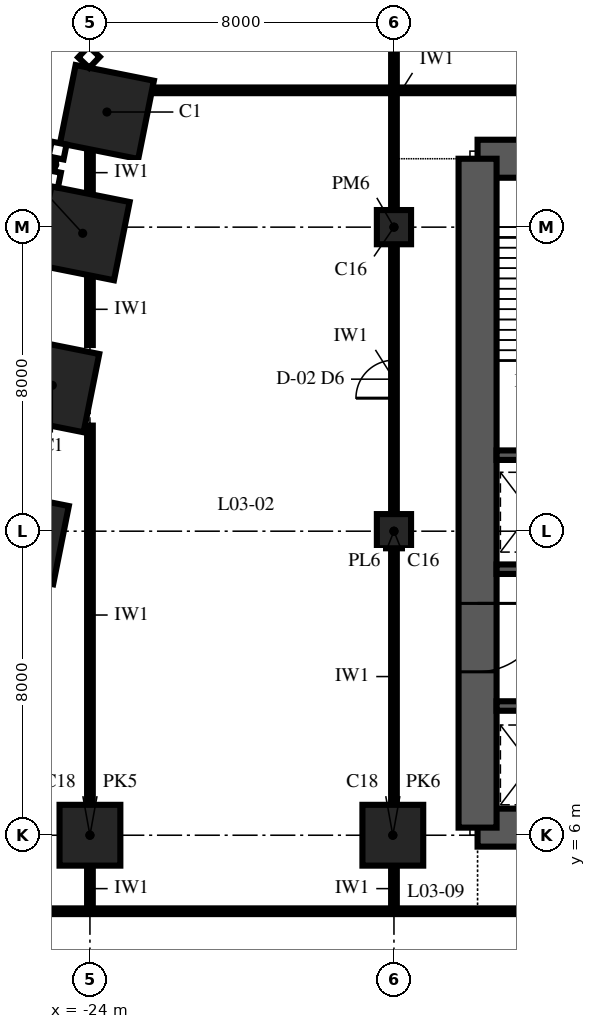
"""IFC4 building model, lengths in metres.
Left out: names, types, materials, properties, quantities, classifications, styles, units other than length and angle.
Written with IfcOpenShell. Run it as: python <this file> out.ifc"""

import sys

from ifc_helpers import new_model, si_unit, direction, frame, frame_2d, origin, origin_2d, place, context, subcontext, project, spatial, polyline, rectangle, outline, extrude, element, fill, save


model = new_model("IFC4")
c1 = context("Model", 3, precision=1e-05, world=origin(), true_north=direction((0.0, 1.0)))
c2 = subcontext(c1, "Body", "Model", "MODEL_VIEW")
j1 = project(units=[si_unit("LENGTHUNIT", "METRE"), si_unit("PLANEANGLEUNIT", "RADIAN")], contexts=[c1])
p1 = place(None, origin())
s1 = spatial("IfcSite", under=j1, at=p1, CompositionType="ELEMENT")
p2 = place(p1, origin())
s2 = spatial("IfcBuilding", under=s1, at=p2, CompositionType="ELEMENT")
p3 = place(p2, frame((0.0, 0.0, 19.0)))
s3 = spatial("IfcBuildingStorey", under=s2, at=p3, CompositionType="ELEMENT", Elevation=19.0)
for number, where, z_axis, x_axis in (
    (1, (-23.553, 25.029, 0.0), (0.0, 0.0, 1.0), (-0.196, -0.981, 0.0)),
    (2, (-24.191, 21.838, 0.0), (0.0, 0.0, 1.0), (-0.196, -0.981, 0.0)),
    (3, (-24.991, 17.838, 0.0), (0.0, 0.0, 1.0), (-0.196, -0.981, 0.0)),
    (4, (-25.791, 13.838, 0.0), (0.0, 0.0, 1.0), (-0.196, -0.981, 0.0)),
):
    element("IfcColumn", number, at=place(p3, frame(where, z_axis=z_axis, x_axis=x_axis)), inside=s3, PredefinedType="COLUMN", context=c2, shape_type="SweptSolid", body=[
        extrude(rectangle(XDim=2.1, YDim=2.1, at=origin_2d()), origin(), (0.0, 0.0, 1.0), 9.0),
    ])
for number, where, z_axis, x_axis in (
    (5, (-24.0, 6.0, 0.0), (0.0, 0.0, 1.0), (1.0, 0.0, 0.0)),
    (6, (-16.03, 6.0, 0.0), (0.0, 0.0, 1.0), (1.0, 0.0, 0.0)),
):
    element("IfcColumn", number, at=place(p3, frame(where, z_axis=z_axis, x_axis=x_axis)), inside=s3, PredefinedType="COLUMN", context=c2, shape_type="SweptSolid", body=[
        extrude(rectangle(XDim=1.6, YDim=1.6, at=origin_2d()), origin(), (0.0, 0.0, 1.0), 9.0),
    ])
for number, where, z_axis, x_axis in (
    (7, (-16.0, 14.0, 0.0), (0.0, 0.0, 1.0), (1.0, 0.0, 0.0)),
    (8, (-16.0, 22.0, 0.0), (0.0, 0.0, 1.0), (1.0, 0.0, 0.0)),
):
    element("IfcColumn", number, at=place(p3, frame(where, z_axis=z_axis, x_axis=x_axis)), inside=s3, PredefinedType="COLUMN", context=c2, shape_type="SweptSolid", body=[
        extrude(rectangle(XDim=0.9, YDim=0.9, at=origin_2d()), origin(), (0.0, 0.0, 1.0), 9.0),
    ])
p4 = place(p3, frame((-13.8, 6.2, 0.0), z_axis=(0.0, 0.0, 1.0), x_axis=(1.0, 0.0, 0.0)))
e9 = element("IfcWall", 9, at=p4, inside=s3, PredefinedType="SHEAR", context=c2, shape_type="SweptSolid", body=[
    extrude(rectangle(XDim=27.6, YDim=1.0, at=frame_2d((13.8, 0.0))), origin(), (0.0, 0.0, 1.0), 9.0),
])
p5 = place(p3, frame((13.8, 23.8, 0.0), z_axis=(0.0, 0.0, 1.0), x_axis=(-1.0, 0.0, 0.0)))
e10 = element("IfcWall", 10, at=p5, inside=s3, PredefinedType="SHEAR", context=c2, shape_type="SweptSolid", body=[
    extrude(rectangle(XDim=27.6, YDim=1.0, at=frame_2d((13.8, 0.0))), origin(), (0.0, 0.0, 1.0), 9.0),
])
p6 = place(p5, frame((21.7, 0.0, 0.0)))
e11 = element("IfcOpeningElement", 11, at=p6, cuts=e10, PredefinedType="OPENING", context=c2, shape_type="SweptSolid", body=[
    extrude(rectangle(XDim=1.0, YDim=2.1, at=frame_2d((0.5, 1.05))), frame((0.0, 0.515, 0.0), z_axis=(0.0, -1.0, 0.0), x_axis=(1.0, 0.0, 0.0)), (0.0, 0.0, 1.0), 1.03),
])
p7 = place(p5, frame((4.9, 0.0, 0.0)))
e12 = element("IfcOpeningElement", 12, at=p7, cuts=e10, PredefinedType="OPENING", context=c2, shape_type="SweptSolid", body=[
    extrude(rectangle(XDim=1.0, YDim=2.1, at=frame_2d((0.5, 1.05))), frame((0.0, 0.515, 0.0), z_axis=(0.0, -1.0, 0.0), x_axis=(1.0, 0.0, 0.0)), (0.0, 0.0, 1.0), 1.03),
])
p8 = place(p5, frame((17.3, 0.0, 0.0)))
e13 = element("IfcOpeningElement", 13, at=p8, cuts=e10, PredefinedType="OPENING", context=c2, shape_type="SweptSolid", body=[
    extrude(rectangle(XDim=1.0, YDim=2.1, at=frame_2d((0.5, 1.05))), frame((0.0, 0.515, 0.0), z_axis=(0.0, -1.0, 0.0), x_axis=(1.0, 0.0, 0.0)), (0.0, 0.0, 1.0), 1.03),
])
p9 = place(p5, frame((13.3, 0.0, 0.0)))
e14 = element("IfcOpeningElement", 14, at=p9, cuts=e10, PredefinedType="OPENING", context=c2, shape_type="SweptSolid", body=[
    extrude(rectangle(XDim=1.0, YDim=2.1, at=frame_2d((0.5, 1.05))), frame((0.0, 0.515, 0.0), z_axis=(0.0, -1.0, 0.0), x_axis=(1.0, 0.0, 0.0)), (0.0, 0.0, 1.0), 1.03),
])
p10 = place(p5, frame((9.3, 0.0, 0.0)))
e15 = element("IfcOpeningElement", 15, at=p10, cuts=e10, PredefinedType="OPENING", context=c2, shape_type="SweptSolid", body=[
    extrude(rectangle(XDim=1.0, YDim=2.1, at=frame_2d((0.5, 1.05))), frame((0.0, 0.515, 0.0), z_axis=(0.0, -1.0, 0.0), x_axis=(1.0, 0.0, 0.0)), (0.0, 0.0, 1.0), 1.03),
])
p11 = place(p3, frame((-13.8, 23.8, 0.0), z_axis=(0.0, 0.0, 1.0), x_axis=(0.0, -1.0, 0.0)))
e16 = element("IfcWall", 16, at=p11, inside=s3, PredefinedType="SHEAR", context=c2, shape_type="SweptSolid", body=[
    extrude(outline(polyline([(0.0, -0.5), (17.6, -0.5), (17.6, 0.0), (17.1, 0.0), (17.1, 0.5), (0.5, 0.5), (0.5, 0.0), (0.0, 0.0), (0.0, -0.5)])), origin(), (0.0, 0.0, 1.0), 9.0),
])
p12 = place(p11, frame((11.7, 0.0, 0.0)))
e17 = element("IfcOpeningElement", 17, at=p12, cuts=e16, PredefinedType="OPENING", context=c2, shape_type="SweptSolid", body=[
    extrude(rectangle(XDim=1.8, YDim=2.4, at=frame_2d((0.9, 1.2))), frame((0.0, 0.515, 0.0), z_axis=(0.0, -1.0, 0.0), x_axis=(1.0, 0.0, 0.0)), (0.0, 0.0, 1.0), 1.03),
])
p13 = place(p3, frame((-13.3, 9.4, 0.0), z_axis=(0.0, 0.0, 1.0), x_axis=(1.0, 0.0, 0.0)))
e18 = element("IfcWall", 18, at=p13, inside=s3, PredefinedType="SHEAR", context=c2, shape_type="SweptSolid", body=[
    extrude(rectangle(XDim=26.6, YDim=0.25, at=frame_2d((13.3, 0.0))), origin(), (0.0, 0.0, 1.0), 9.0),
])
p14 = place(p3, frame((-13.3, 13.0, 0.0), z_axis=(0.0, 0.0, 1.0), x_axis=(1.0, 0.0, 0.0)))
e19 = element("IfcWall", 19, at=p14, inside=s3, PredefinedType="SHEAR", context=c2, shape_type="SweptSolid", body=[
    extrude(rectangle(XDim=26.6, YDim=0.25, at=frame_2d((13.3, 0.0))), origin(), (0.0, 0.0, 1.0), 9.0),
])
p15 = place(p14, frame((16.45, 0.0, 0.0)))
e20 = element("IfcOpeningElement", 20, at=p15, cuts=e19, PredefinedType="OPENING", context=c2, shape_type="SweptSolid", body=[
    extrude(rectangle(XDim=0.9, YDim=2.1, at=frame_2d((0.45, 1.05))), frame((0.0, 0.14, 0.0), z_axis=(0.0, -1.0, 0.0), x_axis=(1.0, 0.0, 0.0)), (0.0, 0.0, 1.0), 0.28),
])
p16 = place(p14, frame((20.05, 0.0, 0.0)))
e21 = element("IfcOpeningElement", 21, at=p16, cuts=e19, PredefinedType="OPENING", context=c2, shape_type="SweptSolid", body=[
    extrude(rectangle(XDim=0.9, YDim=2.1, at=frame_2d((0.45, 1.05))), frame((0.0, 0.14, 0.0), z_axis=(0.0, -1.0, 0.0), x_axis=(1.0, 0.0, 0.0)), (0.0, 0.0, 1.0), 0.28),
])
p17 = place(p14, frame((22.05, 0.0, 0.0)))
e22 = element("IfcOpeningElement", 22, at=p17, cuts=e19, PredefinedType="OPENING", context=c2, shape_type="SweptSolid", body=[
    extrude(rectangle(XDim=0.9, YDim=2.1, at=frame_2d((0.45, 1.05))), frame((0.0, 0.14, 0.0), z_axis=(0.0, -1.0, 0.0), x_axis=(1.0, 0.0, 0.0)), (0.0, 0.0, 1.0), 0.28),
])
p18 = place(p3, frame((-13.3, 16.0, 0.0), z_axis=(0.0, 0.0, 1.0), x_axis=(1.0, 0.0, 0.0)))
e23 = element("IfcWall", 23, at=p18, inside=s3, PredefinedType="SHEAR", context=c2, shape_type="SweptSolid", body=[
    extrude(rectangle(XDim=26.6, YDim=0.25, at=frame_2d((13.3, 0.0))), origin(), (0.0, 0.0, 1.0), 9.0),
])
p19 = place(p3, frame((-24.0, 4.0, 0.0), z_axis=(0.0, 0.0, 1.0), x_axis=(0.0, 1.0, 0.0)))
e24 = element("IfcWall", 24, at=p19, inside=s3, PredefinedType="PARTITIONING", context=c2, shape_type="SweptSolid", body=[
    extrude(rectangle(XDim=1.19, YDim=0.15, at=frame_2d((0.595, 0.0))), origin(), (0.0, 0.0, 1.0), 8.75),
])
p20 = place(p3, frame((-24.0, 6.81, 0.0), z_axis=(0.0, 0.0, 1.0), x_axis=(0.0, 1.0, 0.0)))
e25 = element("IfcWall", 25, at=p20, inside=s3, PredefinedType="PARTITIONING", context=c2, shape_type="SweptSolid", body=[
    extrude(rectangle(XDim=9.968, YDim=0.15, at=frame_2d((4.984, 0.0))), origin(), (0.0, 0.0, 1.0), 8.75),
])
p21 = place(p3, frame((-24.0, 18.898, 0.0), z_axis=(0.0, 0.0, 1.0), x_axis=(0.0, 1.0, 0.0)))
e26 = element("IfcWall", 26, at=p21, inside=s3, PredefinedType="PARTITIONING", context=c2, shape_type="SweptSolid", body=[
    extrude(rectangle(XDim=1.88, YDim=0.15, at=frame_2d((0.94, 0.0))), origin(), (0.0, 0.0, 1.0), 7.1),
])
p22 = place(p3, frame((-24.0, 22.898, 0.0), z_axis=(0.0, 0.0, 1.0), x_axis=(0.0, 1.0, 0.0)))
e27 = element("IfcWall", 27, at=p22, inside=s3, PredefinedType="PARTITIONING", context=c2, shape_type="SweptSolid", body=[
    extrude(rectangle(XDim=1.071, YDim=0.15, at=frame_2d((0.536, 0.0))), origin(), (0.0, 0.0, 1.0), 7.1),
])
p23 = place(p3, frame((-16.0, 4.0, 0.0), z_axis=(0.0, 0.0, 1.0), x_axis=(0.0, 1.0, 0.0)))
e28 = element("IfcWall", 28, at=p23, inside=s3, PredefinedType="PARTITIONING", context=c2, shape_type="SweptSolid", body=[
    extrude(rectangle(XDim=1.19, YDim=0.15, at=frame_2d((0.595, 0.0))), origin(), (0.0, 0.0, 1.0), 8.75),
])
p24 = place(p3, frame((-16.0, 6.81, 0.0), z_axis=(0.0, 0.0, 1.0), x_axis=(0.0, 1.0, 0.0)))
e29 = element("IfcWall", 29, at=p24, inside=s3, PredefinedType="PARTITIONING", context=c2, shape_type="SweptSolid", body=[
    extrude(rectangle(XDim=6.73, YDim=0.15, at=frame_2d((3.365, 0.0))), origin(), (0.0, 0.0, 1.0), 8.75),
])
p25 = place(p3, frame((-16.0, 14.46, 0.0), z_axis=(0.0, 0.0, 1.0), x_axis=(0.0, 1.0, 0.0)))
e30 = element("IfcWall", 30, at=p25, inside=s3, PredefinedType="PARTITIONING", context=c2, shape_type="SweptSolid", body=[
    extrude(rectangle(XDim=7.08, YDim=0.15, at=frame_2d((3.54, 0.0))), origin(), (0.0, 0.0, 1.0), 8.75),
])
p26 = place(p25, frame((3.04, 0.0, 0.0)))
e31 = element("IfcOpeningElement", 31, at=p26, cuts=e30, PredefinedType="OPENING", context=c2, shape_type="SweptSolid", body=[
    extrude(rectangle(XDim=1.0, YDim=2.1, at=frame_2d((0.5, 1.05))), frame((0.0, 0.09, 0.0), z_axis=(0.0, -1.0, 0.0), x_axis=(1.0, 0.0, 0.0)), (0.0, 0.0, 1.0), 0.18),
])
p27 = place(p3, frame((-16.0, 22.46, 0.0), z_axis=(0.0, 0.0, 1.0), x_axis=(0.0, 1.0, 0.0)))
e32 = element("IfcWall", 32, at=p27, inside=s3, PredefinedType="PARTITIONING", context=c2, shape_type="SweptSolid", body=[
    extrude(rectangle(XDim=5.655, YDim=0.15, at=frame_2d((2.828, 0.0))), origin(), (0.0, 0.0, 1.0), 8.317),
])
p28 = place(p3, frame((-26.0, 4.0, 0.0), z_axis=(0.0, 0.0, 1.0), x_axis=(1.0, 0.0, 0.0)))
e33 = element("IfcWall", 33, at=p28, inside=s3, PredefinedType="PARTITIONING", context=c2, shape_type="SweptSolid", body=[
    extrude(rectangle(XDim=52.0, YDim=0.15, at=frame_2d((26.0, 0.0))), origin(), (0.0, 0.0, 1.0), 8.75),
])
p29 = place(p28, frame((25.5, 0.0, 0.0)))
e34 = element("IfcOpeningElement", 34, at=p29, cuts=e33, PredefinedType="OPENING", context=c2, shape_type="SweptSolid", body=[
    extrude(rectangle(XDim=1.0, YDim=2.1, at=frame_2d((0.5, 1.05))), frame((0.0, 0.09, 0.0), z_axis=(0.0, -1.0, 0.0), x_axis=(1.0, 0.0, 0.0)), (0.0, 0.0, 1.0), 0.18),
])
p30 = place(p3, frame((-22.493, 25.6, 0.0), z_axis=(0.0, 0.0, 1.0), x_axis=(1.0, 0.0, 0.0)))
e35 = element("IfcWall", 35, at=p30, inside=s3, PredefinedType="PARTITIONING", context=c2, shape_type="SweptSolid", body=[
    extrude(rectangle(XDim=44.986, YDim=0.15, at=frame_2d((22.493, 0.0))), origin(), (0.0, 0.0, 1.0), 8.75),
])
p31 = place(p30, frame((10.993, 0.0, 0.0)))
e36 = element("IfcOpeningElement", 36, at=p31, cuts=e35, PredefinedType="OPENING", context=c2, shape_type="SweptSolid", body=[
    extrude(rectangle(XDim=1.0, YDim=2.1, at=frame_2d((0.5, 1.05))), frame((0.0, 0.09, 0.0), z_axis=(0.0, -1.0, 0.0), x_axis=(1.0, 0.0, 0.0)), (0.0, 0.0, 1.0), 0.18),
])
p32 = place(p30, frame((20.993, 0.0, 0.0)))
e37 = element("IfcOpeningElement", 37, at=p32, cuts=e35, PredefinedType="OPENING", context=c2, shape_type="SweptSolid", body=[
    extrude(rectangle(XDim=1.0, YDim=2.1, at=frame_2d((0.5, 1.05))), frame((0.0, 0.09, 0.0), z_axis=(0.0, -1.0, 0.0), x_axis=(1.0, 0.0, 0.0)), (0.0, 0.0, 1.0), 0.18),
])
p33 = place(p30, frame((27.993, 0.0, 0.0)))
e38 = element("IfcOpeningElement", 38, at=p33, cuts=e35, PredefinedType="OPENING", context=c2, shape_type="SweptSolid", body=[
    extrude(rectangle(XDim=1.0, YDim=2.1, at=frame_2d((0.5, 1.05))), frame((0.0, 0.09, 0.0), z_axis=(0.0, -1.0, 0.0), x_axis=(1.0, 0.0, 0.0)), (0.0, 0.0, 1.0), 0.18),
])
p34 = place(p12, origin())
e39 = element("IfcDoor", 39, at=p34, inside=s3, OperationType="DOUBLE_DOOR_SINGLE_SWING", PredefinedType="DOOR", context=c2, shape_type="SweptSolid", body=[
    extrude(rectangle(XDim=1.8, YDim=2.4, at=frame_2d((0.9, 1.2))), frame((0.0, 0.5, 0.0), z_axis=(0.0, -1.0, 0.0), x_axis=(1.0, 0.0, 0.0)), (0.0, 0.0, 1.0), 1.0),
])
fill(e17, e39)
p35 = place(p26, origin())
e40 = element("IfcDoor", 40, at=p35, inside=s3, OperationType="SINGLE_SWING_LEFT", PredefinedType="DOOR", context=c2, shape_type="SweptSolid", body=[
    extrude(rectangle(XDim=1.0, YDim=2.1, at=frame_2d((0.5, 1.05))), frame((0.0, 0.075, 0.0), z_axis=(0.0, -1.0, 0.0), x_axis=(1.0, 0.0, 0.0)), (0.0, 0.0, 1.0), 0.149),
])
fill(e31, e40)
save(model, sys.argv[1])
